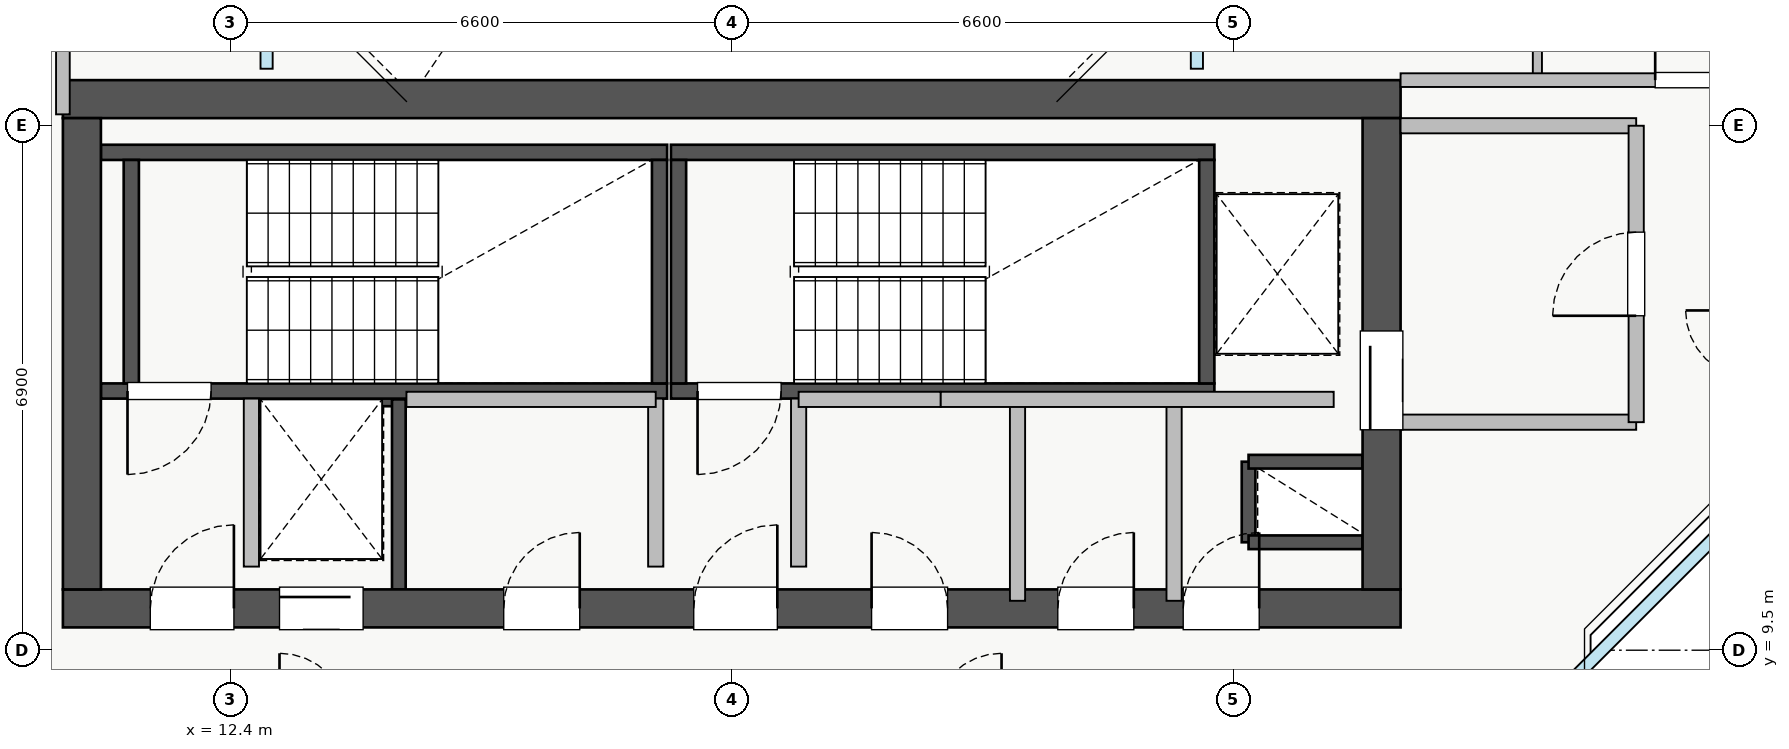
"""IFC4 building model, lengths in metres.
Left out: names, types, materials, properties, quantities, classifications, styles, units other than length and angle.
Written with IfcOpenShell. Run it as: python <this file> out.ifc"""

import sys

from ifc_helpers import new_model, si_unit, direction, frame, frame_2d, origin, place, context, subcontext, project, spatial, rectangle, extrude, source, transform, mapped, element, fill, save


model = new_model("IFC4")
c1 = context("Model", 3, precision=1e-05, world=origin(), true_north=direction((0.0, 1.0)))
c2 = subcontext(c1, "Body", "Model", "MODEL_VIEW")
j1 = project(units=[si_unit("LENGTHUNIT", "METRE"), si_unit("PLANEANGLEUNIT", "RADIAN")], contexts=[c1])
p1 = place(None, origin())
s1 = spatial("IfcSite", under=j1, at=p1, CompositionType="ELEMENT")
p2 = place(p1, origin())
s2 = spatial("IfcBuilding", under=s1, at=p2, CompositionType="ELEMENT")
p3 = place(p2, frame((0.0, 0.0, 250.25)))
s3 = spatial("IfcBuildingStorey", under=s2, at=p3, CompositionType="ELEMENT", Elevation=250.25)
p4 = place(p3, frame((12.68, 12.8, 0.0), z_axis=(0.0, 0.0, 1.0), x_axis=(1.0, 0.0, 0.0)))
e1 = element("IfcWall", 1, at=p4, inside=s3, PredefinedType="SHEAR", context=c2, shape_type="SweptSolid", body=[
    extrude(rectangle(XDim=1.94, YDim=0.18, at=frame_2d((0.97, 0.0))), origin(), (0.0, 0.0, 1.0), 3.07),
])
p5 = place(p3, frame((14.62, 10.3, 0.0), z_axis=(0.0, 0.0, 1.0), x_axis=(0.0, 1.0, 0.0)))
e2 = element("IfcWall", 2, at=p5, inside=s3, PredefinedType="SHEAR", context=c2, shape_type="SweptSolid", body=[
    extrude(rectangle(XDim=2.5, YDim=0.18, at=frame_2d((1.25, 0.0))), origin(), (0.0, 0.0, 1.0), 3.07),
])
p6 = place(p3, frame((25.8, 10.92, 0.0), z_axis=(0.0, 0.0, 1.0), x_axis=(0.0, 1.0, 0.0)))
e3 = element("IfcWall", 3, at=p6, inside=s3, PredefinedType="SHEAR", context=c2, shape_type="SweptSolid", body=[
    extrude(rectangle(XDim=1.06, YDim=0.18, at=frame_2d((0.53, 0.0))), origin(), (0.0, 0.0, 1.0), 3.07),
])
for number, where, z_axis, x_axis in (
    (4, (25.8, 11.98, 0.0), (0.0, 0.0, 1.0), (1.0, 0.0, 0.0)),
    (5, (25.8, 10.92, 0.0), (0.0, 0.0, 1.0), (1.0, 0.0, 0.0)),
):
    element("IfcWall", number, at=place(p3, frame(where, z_axis=z_axis, x_axis=x_axis)), inside=s3, PredefinedType="SHEAR", context=c2, shape_type="SweptSolid", body=[
        extrude(rectangle(XDim=1.5, YDim=0.18, at=frame_2d((0.75, 0.0))), origin(), (0.0, 0.0, 1.0), 3.07),
    ])
p7 = place(p3, frame((10.7, 12.91, 0.0), z_axis=(0.0, 0.0, 1.0), x_axis=(1.0, 0.0, 0.0)))
e6 = element("IfcWall", 6, at=p7, inside=s3, PredefinedType="SHEAR", context=c2, shape_type="SweptSolid", body=[
    extrude(rectangle(XDim=7.45, YDim=0.2, at=frame_2d((3.725, 0.0))), origin(), (0.0, 0.0, 1.0), 3.25),
])
p8 = place(p7, frame((0.35, 0.0, 0.0)))
e7 = element("IfcOpeningElement", 7, at=p8, cuts=e6, PredefinedType="OPENING", context=c2, shape_type="SweptSolid", body=[
    extrude(rectangle(XDim=1.1, YDim=2.05, at=frame_2d((0.55, 1.025))), frame((0.0, 0.11, 0.0), z_axis=(0.0, -1.0, 0.0), x_axis=(1.0, 0.0, 0.0)), (0.0, 0.0, 1.0), 0.22),
])
p9 = place(p3, frame((10.7, 16.05, 0.0), z_axis=(0.0, 0.0, 1.0), x_axis=(1.0, 0.0, 0.0)))
e8 = element("IfcWall", 8, at=p9, inside=s3, PredefinedType="SHEAR", context=c2, shape_type="SweptSolid", body=[
    extrude(rectangle(XDim=7.45, YDim=0.2, at=frame_2d((3.725, 0.0))), origin(), (0.0, 0.0, 1.0), 3.25),
])
for number, where, z_axis, x_axis in (
    (9, (11.1, 13.01, 0.0), (0.0, 0.0, 1.0), (0.0, 1.0, 0.0)),
    (10, (18.05, 13.01, 0.0), (0.0, 0.0, 1.0), (0.0, 1.0, 0.0)),
):
    element("IfcWall", number, at=place(p3, frame(where, z_axis=z_axis, x_axis=x_axis)), inside=s3, PredefinedType="SHEAR", context=c2, shape_type="SweptSolid", body=[
        extrude(rectangle(XDim=2.94, YDim=0.2, at=frame_2d((1.47, 0.0))), origin(), (0.0, 0.0, 1.0), 3.25),
    ])
p10 = place(p3, frame((18.2, 12.91, 0.0), z_axis=(0.0, 0.0, 1.0), x_axis=(1.0, 0.0, 0.0)))
e11 = element("IfcWall", 11, at=p10, inside=s3, PredefinedType="SHEAR", context=c2, shape_type="SweptSolid", body=[
    extrude(rectangle(XDim=7.15, YDim=0.2, at=frame_2d((3.575, 0.0))), origin(), (0.0, 0.0, 1.0), 3.25),
])
p11 = place(p10, frame((0.35, 0.0, 0.0)))
e12 = element("IfcOpeningElement", 12, at=p11, cuts=e11, PredefinedType="OPENING", context=c2, shape_type="SweptSolid", body=[
    extrude(rectangle(XDim=1.1, YDim=2.05, at=frame_2d((0.55, 1.025))), frame((0.0, 0.11, 0.0), z_axis=(0.0, -1.0, 0.0), x_axis=(1.0, 0.0, 0.0)), (0.0, 0.0, 1.0), 0.22),
])
p12 = place(p3, frame((18.2, 16.05, 0.0), z_axis=(0.0, 0.0, 1.0), x_axis=(1.0, 0.0, 0.0)))
e13 = element("IfcWall", 13, at=p12, inside=s3, PredefinedType="SHEAR", context=c2, shape_type="SweptSolid", body=[
    extrude(rectangle(XDim=7.15, YDim=0.2, at=frame_2d((3.575, 0.0))), origin(), (0.0, 0.0, 1.0), 3.25),
])
for number, where, z_axis, x_axis in (
    (14, (18.3, 13.01, 0.0), (0.0, 0.0, 1.0), (0.0, 1.0, 0.0)),
    (15, (25.25, 13.01, 0.0), (0.0, 0.0, 1.0), (0.0, 1.0, 0.0)),
):
    element("IfcWall", number, at=place(p3, frame(where, z_axis=z_axis, x_axis=x_axis)), inside=s3, PredefinedType="SHEAR", context=c2, shape_type="SweptSolid", body=[
        extrude(rectangle(XDim=2.94, YDim=0.2, at=frame_2d((1.47, 0.0))), origin(), (0.0, 0.0, 1.0), 3.25),
    ])
p13 = place(p3, frame((10.2, 10.05, 0.0), z_axis=(0.0, 0.0, 1.0), x_axis=(1.0, 0.0, 0.0)))
e16 = element("IfcWall", 16, at=p13, inside=s3, PredefinedType="SHEAR", context=c2, shape_type="SweptSolid", body=[
    extrude(rectangle(XDim=17.6, YDim=0.5, at=frame_2d((8.8, 0.0))), origin(), (0.0, 0.0, 1.0), 3.25),
])
p14 = place(p13, frame((1.15, 0.0, 0.0)))
e17 = element("IfcOpeningElement", 17, at=p14, cuts=e16, PredefinedType="OPENING", context=c2, shape_type="SweptSolid", body=[
    extrude(rectangle(XDim=1.1, YDim=2.05, at=frame_2d((0.55, 1.025))), frame((0.0, 0.26, 0.0), z_axis=(0.0, -1.0, 0.0), x_axis=(1.0, 0.0, 0.0)), (0.0, 0.0, 1.0), 0.52),
])
p15 = place(p13, frame((8.3, 0.0, 0.0)))
e18 = element("IfcOpeningElement", 18, at=p15, cuts=e16, PredefinedType="OPENING", context=c2, shape_type="SweptSolid", body=[
    extrude(rectangle(XDim=1.1, YDim=2.05, at=frame_2d((0.55, 1.025))), frame((0.0, 0.26, 0.0), z_axis=(0.0, -1.0, 0.0), x_axis=(1.0, 0.0, 0.0)), (0.0, 0.0, 1.0), 0.52),
])
p16 = place(p13, frame((2.85, 0.0, 0.0)))
e19 = element("IfcOpeningElement", 19, at=p16, cuts=e16, PredefinedType="OPENING", context=c2, shape_type="SweptSolid", body=[
    extrude(rectangle(XDim=1.1, YDim=2.05, at=frame_2d((0.55, 1.025))), frame((0.0, 0.26, 0.0), z_axis=(0.0, -1.0, 0.0), x_axis=(1.0, 0.0, 0.0)), (0.0, 0.0, 1.0), 0.52),
])
p17 = place(p13, frame((5.8, 0.0, 0.0)))
e20 = element("IfcOpeningElement", 20, at=p17, cuts=e16, PredefinedType="OPENING", context=c2, shape_type="SweptSolid", body=[
    extrude(rectangle(XDim=1.0, YDim=2.05, at=frame_2d((0.5, 1.025))), frame((0.0, 0.26, 0.0), z_axis=(0.0, -1.0, 0.0), x_axis=(1.0, 0.0, 0.0)), (0.0, 0.0, 1.0), 0.52),
])
p18 = place(p13, frame((14.74, 0.0, 0.0)))
e21 = element("IfcOpeningElement", 21, at=p18, cuts=e16, PredefinedType="OPENING", context=c2, shape_type="SweptSolid", body=[
    extrude(rectangle(XDim=1.0, YDim=2.05, at=frame_2d((0.5, 1.025))), frame((0.0, 0.26, 0.0), z_axis=(0.0, -1.0, 0.0), x_axis=(1.0, 0.0, 0.0)), (0.0, 0.0, 1.0), 0.52),
])
p19 = place(p13, frame((10.64, 0.0, 0.0)))
e22 = element("IfcOpeningElement", 22, at=p19, cuts=e16, PredefinedType="OPENING", context=c2, shape_type="SweptSolid", body=[
    extrude(rectangle(XDim=1.0, YDim=2.05, at=frame_2d((0.5, 1.025))), frame((0.0, 0.26, 0.0), z_axis=(0.0, -1.0, 0.0), x_axis=(1.0, 0.0, 0.0)), (0.0, 0.0, 1.0), 0.52),
])
p20 = place(p13, frame((13.09, 0.0, 0.0)))
e23 = element("IfcOpeningElement", 23, at=p20, cuts=e16, PredefinedType="OPENING", context=c2, shape_type="SweptSolid", body=[
    extrude(rectangle(XDim=1.0, YDim=2.05, at=frame_2d((0.5, 1.025))), frame((0.0, 0.26, 0.0), z_axis=(0.0, -1.0, 0.0), x_axis=(1.0, 0.0, 0.0)), (0.0, 0.0, 1.0), 0.52),
])
p21 = place(p3, frame((10.2, 16.75, 0.0), z_axis=(0.0, 0.0, 1.0), x_axis=(1.0, 0.0, 0.0)))
e24 = element("IfcWall", 24, at=p21, inside=s3, PredefinedType="SHEAR", context=c2, shape_type="SweptSolid", body=[
    extrude(rectangle(XDim=17.6, YDim=0.5, at=frame_2d((8.8, 0.0))), origin(), (0.0, 0.0, 1.0), 3.25),
])
p22 = place(p3, frame((10.45, 10.3, 0.0), z_axis=(0.0, 0.0, 1.0), x_axis=(0.0, 1.0, 0.0)))
e25 = element("IfcWall", 25, at=p22, inside=s3, PredefinedType="SHEAR", context=c2, shape_type="SweptSolid", body=[
    extrude(rectangle(XDim=6.2, YDim=0.5, at=frame_2d((3.1, 0.0))), origin(), (0.0, 0.0, 1.0), 3.25),
])
p23 = place(p3, frame((27.55, 10.3, 0.0), z_axis=(0.0, 0.0, 1.0), x_axis=(0.0, 1.0, 0.0)))
e26 = element("IfcWall", 26, at=p23, inside=s3, PredefinedType="SHEAR", context=c2, shape_type="SweptSolid", body=[
    extrude(rectangle(XDim=6.2, YDim=0.5, at=frame_2d((3.1, 0.0))), origin(), (0.0, 0.0, 1.0), 3.25),
])
p24 = place(p23, frame((2.1, 0.0, 0.0)))
e27 = element("IfcOpeningElement", 27, at=p24, cuts=e26, PredefinedType="OPENING", context=c2, shape_type="SweptSolid", body=[
    extrude(rectangle(XDim=1.3, YDim=2.05, at=frame_2d((0.65, 1.025))), frame((0.0, 0.26, 0.0), z_axis=(0.0, -1.0, 0.0), x_axis=(1.0, 0.0, 0.0)), (0.0, 0.0, 1.0), 0.52),
])
for number, where, z_axis, x_axis in (
    (28, (27.8, 16.4, 0.0), (0.0, 0.0, 1.0), (1.0, 0.0, 0.0)),
    (29, (27.8, 12.5, 0.0), (0.0, 0.0, 1.0), (1.0, 0.0, 0.0)),
):
    element("IfcWall", number, at=place(p3, frame(where, z_axis=z_axis, x_axis=x_axis)), inside=s3, PredefinedType="PARTITIONING", context=c2, shape_type="SweptSolid", body=[
        extrude(rectangle(XDim=3.1, YDim=0.2, at=frame_2d((1.55, 0.0))), origin(), (0.0, 0.0, 1.0), 3.07),
    ])
p25 = place(p3, frame((30.9, 12.5, 0.0), z_axis=(0.0, 0.0, 1.0), x_axis=(0.0, 1.0, 0.0)))
e30 = element("IfcWall", 30, at=p25, inside=s3, PredefinedType="PARTITIONING", context=c2, shape_type="SweptSolid", body=[
    extrude(rectangle(XDim=3.9, YDim=0.2, at=frame_2d((1.95, 0.0))), origin(), (0.0, 0.0, 1.0), 2.765),
])
p26 = place(p25, frame((1.4, 0.0, 0.0)))
e31 = element("IfcOpeningElement", 31, at=p26, cuts=e30, PredefinedType="OPENING", context=c2, shape_type="SweptSolid", body=[
    extrude(rectangle(XDim=1.1, YDim=2.05, at=frame_2d((0.55, 1.025))), frame((0.0, 0.11, 0.0), z_axis=(0.0, -1.0, 0.0), x_axis=(1.0, 0.0, 0.0)), (0.0, 0.0, 1.0), 0.22),
])
for number, where, z_axis, x_axis in (
    (32, (12.68, 10.6, 0.0), (0.0, 0.0, 1.0), (0.0, 1.0, 0.0)),
    (33, (18.0, 10.6, 0.0), (0.0, 0.0, 1.0), (0.0, 1.0, 0.0)),
    (34, (19.88, 10.6, 0.0), (0.0, 0.0, 1.0), (0.0, 1.0, 0.0)),
):
    element("IfcWall", number, at=place(p3, frame(where, z_axis=z_axis, x_axis=x_axis)), inside=s3, PredefinedType="PARTITIONING", context=c2, shape_type="SweptSolid", body=[
        extrude(rectangle(XDim=2.21, YDim=0.2, at=frame_2d((1.105, 0.0))), origin(), (0.0, 0.0, 1.0), 3.07),
    ])
p27 = place(p3, frame((14.72, 12.8, 0.0), z_axis=(0.0, 0.0, 1.0), x_axis=(1.0, 0.0, 0.0)))
e35 = element("IfcWall", 35, at=p27, inside=s3, PredefinedType="PARTITIONING", context=c2, shape_type="SweptSolid", body=[
    extrude(rectangle(XDim=3.28, YDim=0.2, at=frame_2d((1.64, 0.0))), origin(), (0.0, 0.0, 1.0), 3.07),
])
p28 = place(p3, frame((24.82, 10.15, 0.0), z_axis=(0.0, 0.0, 1.0), x_axis=(0.0, 1.0, 0.0)))
e36 = element("IfcWall", 36, at=p28, inside=s3, PredefinedType="PARTITIONING", context=c2, shape_type="SweptSolid", body=[
    extrude(rectangle(XDim=2.65, YDim=0.2, at=frame_2d((1.325, 0.0))), origin(), (0.0, 0.0, 1.0), 3.07),
])
p29 = place(p3, frame((19.88, 12.8, 0.0), z_axis=(0.0, 0.0, 1.0), x_axis=(1.0, 0.0, 0.0)))
e37 = element("IfcWall", 37, at=p29, inside=s3, PredefinedType="PARTITIONING", context=c2, shape_type="SweptSolid", body=[
    extrude(rectangle(XDim=1.87, YDim=0.2, at=frame_2d((0.935, 0.0))), origin(), (0.0, 0.0, 1.0), 3.07),
])
p30 = place(p3, frame((22.76, 10.15, 0.0), z_axis=(0.0, 0.0, 1.0), x_axis=(0.0, 1.0, 0.0)))
e38 = element("IfcWall", 38, at=p30, inside=s3, PredefinedType="PARTITIONING", context=c2, shape_type="SweptSolid", body=[
    extrude(rectangle(XDim=2.65, YDim=0.2, at=frame_2d((1.325, 0.0))), origin(), (0.0, 0.0, 1.0), 3.07),
])
p31 = place(p3, frame((21.75, 12.8, 0.0), z_axis=(0.0, 0.0, 1.0), x_axis=(1.0, 0.0, 0.0)))
e39 = element("IfcWall", 39, at=p31, inside=s3, PredefinedType="PARTITIONING", context=c2, shape_type="SweptSolid", body=[
    extrude(rectangle(XDim=5.17, YDim=0.2, at=frame_2d((2.585, 0.0))), origin(), (0.0, 0.0, 1.0), 3.07),
])
p32 = place(p3, frame((10.2, 16.55, 0.0), z_axis=(0.0, 0.0, 1.0), x_axis=(0.0, 1.0, 0.0)))
e40 = element("IfcWall", 40, at=p32, inside=s3, PredefinedType="PARTITIONING", context=c2, shape_type="SweptSolid", body=[
    extrude(rectangle(XDim=12.9, YDim=0.18, at=frame_2d((6.45, 0.0))), origin(), (0.0, 0.0, 1.0), 3.07),
])
p33 = place(p32, frame((3.425, 0.0, 0.0)))
e41 = element("IfcOpeningElement", 41, at=p33, cuts=e40, PredefinedType="OPENING", context=c2, shape_type="SweptSolid", body=[
    extrude(rectangle(XDim=0.85, YDim=2.05, at=frame_2d((0.425, 1.025))), frame((0.0, 0.1, 0.0), z_axis=(0.0, -1.0, 0.0), x_axis=(1.0, 0.0, 0.0)), (0.0, 0.0, 1.0), 0.2),
])
p34 = place(p32, frame((9.4, 0.0, 0.0)))
e42 = element("IfcOpeningElement", 42, at=p34, cuts=e40, PredefinedType="OPENING", context=c2, shape_type="SweptSolid", body=[
    extrude(rectangle(XDim=0.9, YDim=2.05, at=frame_2d((0.45, 1.025))), frame((0.0, 0.1, 0.0), z_axis=(0.0, -1.0, 0.0), x_axis=(1.0, 0.0, 0.0)), (0.0, 0.0, 1.0), 0.2),
])
p35 = place(p3, frame((29.6, 17.0, 0.0), z_axis=(0.0, 0.0, 1.0), x_axis=(0.0, 1.0, 0.0)))
e43 = element("IfcWall", 43, at=p35, inside=s3, PredefinedType="PLUMBINGWALL", context=c2, shape_type="SweptSolid", body=[
    extrude(rectangle(XDim=4.8, YDim=0.12, at=frame_2d((2.4, 0.0))), origin(), (0.0, 0.0, 1.0), 3.07),
])
p36 = place(p35, frame((0.555, 0.0, 0.0)))
e44 = element("IfcOpeningElement", 44, at=p36, cuts=e43, PredefinedType="OPENING", context=c2, shape_type="SweptSolid", body=[
    extrude(rectangle(XDim=0.85, YDim=2.05, at=frame_2d((0.425, 1.025))), frame((0.0, 0.07, 0.0), z_axis=(0.0, -1.0, 0.0), x_axis=(1.0, 0.0, 0.0)), (0.0, 0.0, 1.0), 0.14),
])
p37 = place(p35, frame((2.89, 0.0, 0.0)))
e45 = element("IfcOpeningElement", 45, at=p37, cuts=e43, PredefinedType="OPENING", context=c2, shape_type="SweptSolid", body=[
    extrude(rectangle(XDim=0.9, YDim=2.05, at=frame_2d((0.45, 1.025))), frame((0.0, 0.07, 0.0), z_axis=(0.0, -1.0, 0.0), x_axis=(1.0, 0.0, 0.0)), (0.0, 0.0, 1.0), 0.14),
])
p38 = place(p3, frame((27.8, 17.0, 0.0), z_axis=(0.0, 0.0, 1.0), x_axis=(1.0, 0.0, 0.0)))
e46 = element("IfcWall", 46, at=p38, inside=s3, PredefinedType="PARTITIONING", context=c2, shape_type="SweptSolid", body=[
    extrude(rectangle(XDim=6.65, YDim=0.18, at=frame_2d((3.325, 0.0))), origin(), (0.0, 0.0, 1.0), 3.07),
])
p39 = place(p38, frame((3.35, 0.0, 0.0)))
e47 = element("IfcOpeningElement", 47, at=p39, cuts=e46, PredefinedType="OPENING", context=c2, shape_type="SweptSolid", body=[
    extrude(rectangle(XDim=1.0, YDim=2.05, at=frame_2d((0.5, 1.025))), frame((0.0, 0.1, 0.0), z_axis=(0.0, -1.0, 0.0), x_axis=(1.0, 0.0, 0.0)), (0.0, 0.0, 1.0), 0.2),
])
m1 = source(origin(), c2, "Body", "SweptSolid", [
    extrude(rectangle(XDim=1.3, YDim=2.05, at=frame_2d((0.65, 1.025))), frame((0.0, 0.025, 0.0), z_axis=(0.0, -1.0, 0.0), x_axis=(1.0, 0.0, 0.0)), (0.0, 0.0, 1.0), 0.05),
])
p40 = place(p24, origin())
e48 = element("IfcDoor", 48, at=p40, inside=s3, OperationType="SLIDING_TO_RIGHT", PredefinedType="DOOR", context=c2, shape_type="MappedRepresentation", body=[
    mapped(m1, transform((0.0, 0.0, 0.0), x_axis=(1.0, 0.0, 0.0), y_axis=(0.0, 1.0, 0.0), z_axis=(0.0, 0.0, 1.0), scale=1.0)),
])
fill(e27, e48)
m2 = source(origin(), c2, "Body", "SweptSolid", [
    extrude(rectangle(XDim=1.1, YDim=2.05, at=frame_2d((0.55, 1.025))), frame((0.0, 0.025, 0.0), z_axis=(0.0, -1.0, 0.0), x_axis=(1.0, 0.0, 0.0)), (0.0, 0.0, 1.0), 0.05),
])
p41 = place(p14, origin())
e49 = element("IfcDoor", 49, at=p41, inside=s3, OperationType="SINGLE_SWING_RIGHT", PredefinedType="DOOR", context=c2, shape_type="MappedRepresentation", body=[
    mapped(m2, transform((0.0, 0.0, 0.0), x_axis=(1.0, 0.0, 0.0), y_axis=(0.0, 1.0, 0.0), z_axis=(0.0, 0.0, 1.0), scale=1.0)),
])
fill(e17, e49)
p42 = place(p8, frame((1.1, 0.0, 0.0), z_axis=(0.0, 0.0, 1.0), x_axis=(-1.0, 0.0, 0.0)))
e50 = element("IfcDoor", 50, at=p42, inside=s3, OperationType="SINGLE_SWING_LEFT", PredefinedType="DOOR", context=c2, shape_type="MappedRepresentation", body=[
    mapped(m2, transform((0.0, 0.0, 0.0), x_axis=(1.0, 0.0, 0.0), y_axis=(0.0, 1.0, 0.0), z_axis=(0.0, 0.0, 1.0), scale=1.0)),
])
fill(e7, e50)
p43 = place(p15, origin())
e51 = element("IfcDoor", 51, at=p43, inside=s3, OperationType="SINGLE_SWING_RIGHT", PredefinedType="DOOR", context=c2, shape_type="MappedRepresentation", body=[
    mapped(m2, transform((0.0, 0.0, 0.0), x_axis=(1.0, 0.0, 0.0), y_axis=(0.0, 1.0, 0.0), z_axis=(0.0, 0.0, 1.0), scale=1.0)),
])
fill(e18, e51)
p44 = place(p11, frame((1.1, 0.0, 0.0), z_axis=(0.0, 0.0, 1.0), x_axis=(-1.0, 0.0, 0.0)))
e52 = element("IfcDoor", 52, at=p44, inside=s3, OperationType="SINGLE_SWING_LEFT", PredefinedType="DOOR", context=c2, shape_type="MappedRepresentation", body=[
    mapped(m2, transform((0.0, 0.0, 0.0), x_axis=(1.0, 0.0, 0.0), y_axis=(0.0, 1.0, 0.0), z_axis=(0.0, 0.0, 1.0), scale=1.0)),
])
fill(e12, e52)
p45 = place(p16, origin())
e53 = element("IfcDoor", 53, at=p45, inside=s3, OperationType="SLIDING_TO_RIGHT", PredefinedType="DOOR", context=c2, shape_type="MappedRepresentation", body=[
    mapped(m2, transform((0.0, 0.0, 0.0), x_axis=(1.0, 0.0, 0.0), y_axis=(0.0, 1.0, 0.0), z_axis=(0.0, 0.0, 1.0), scale=1.0)),
])
fill(e19, e53)
m3 = source(origin(), c2, "Body", "SweptSolid", [
    extrude(rectangle(XDim=1.0, YDim=2.05, at=frame_2d((0.5, 1.025))), frame((0.0, 0.025, 0.0), z_axis=(0.0, -1.0, 0.0), x_axis=(1.0, 0.0, 0.0)), (0.0, 0.0, 1.0), 0.05),
])
p46 = place(p17, origin())
e54 = element("IfcDoor", 54, at=p46, inside=s3, OperationType="SINGLE_SWING_RIGHT", PredefinedType="DOOR", context=c2, shape_type="MappedRepresentation", body=[
    mapped(m3, transform((0.0, 0.0, 0.0), x_axis=(1.0, 0.0, 0.0), y_axis=(0.0, 1.0, 0.0), z_axis=(0.0, 0.0, 1.0), scale=1.0)),
])
fill(e20, e54)
p47 = place(p18, origin())
e55 = element("IfcDoor", 55, at=p47, inside=s3, OperationType="SINGLE_SWING_RIGHT", PredefinedType="DOOR", context=c2, shape_type="MappedRepresentation", body=[
    mapped(m3, transform((0.0, 0.0, 0.0), x_axis=(1.0, 0.0, 0.0), y_axis=(0.0, 1.0, 0.0), z_axis=(0.0, 0.0, 1.0), scale=1.0)),
])
fill(e21, e55)
p48 = place(p19, origin())
e56 = element("IfcDoor", 56, at=p48, inside=s3, OperationType="SINGLE_SWING_LEFT", PredefinedType="DOOR", context=c2, shape_type="MappedRepresentation", body=[
    mapped(m3, transform((0.0, 0.0, 0.0), x_axis=(1.0, 0.0, 0.0), y_axis=(0.0, 1.0, 0.0), z_axis=(0.0, 0.0, 1.0), scale=1.0)),
])
fill(e22, e56)
p49 = place(p20, origin())
e57 = element("IfcDoor", 57, at=p49, inside=s3, OperationType="SINGLE_SWING_RIGHT", PredefinedType="DOOR", context=c2, shape_type="MappedRepresentation", body=[
    mapped(m3, transform((0.0, 0.0, 0.0), x_axis=(1.0, 0.0, 0.0), y_axis=(0.0, 1.0, 0.0), z_axis=(0.0, 0.0, 1.0), scale=1.0)),
])
fill(e23, e57)
p50 = place(p26, origin())
e58 = element("IfcDoor", 58, at=p50, inside=s3, OperationType="SINGLE_SWING_LEFT", PredefinedType="DOOR", context=c2, shape_type="MappedRepresentation", body=[
    mapped(m2, transform((0.0, 0.0, 0.0), x_axis=(1.0, 0.0, 0.0), y_axis=(0.0, 1.0, 0.0), z_axis=(0.0, 0.0, 1.0), scale=1.0)),
])
fill(e31, e58)
p51 = place(p39, origin())
e59 = element("IfcDoor", 59, at=p51, inside=s3, OperationType="SINGLE_SWING_LEFT", PredefinedType="DOOR", context=c2, shape_type="MappedRepresentation", body=[
    mapped(m3, transform((0.0, 0.0, 0.0), x_axis=(1.0, 0.0, 0.0), y_axis=(0.0, 1.0, 0.0), z_axis=(0.0, 0.0, 1.0), scale=1.0)),
])
fill(e47, e59)
save(model, sys.argv[1])
